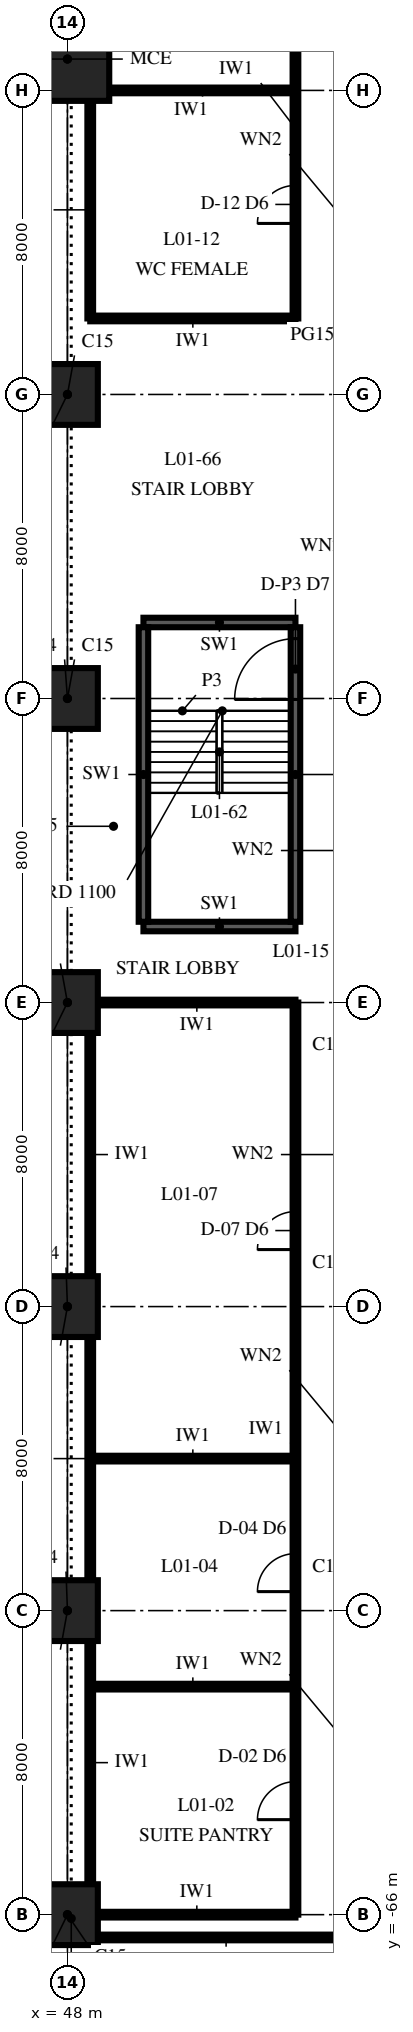
"""IFC4 building model, lengths in metres.
Left out: names, types, materials, properties, quantities, classifications, styles, units other than length and angle.
Written with IfcOpenShell. Run it as: python <this file> out.ifc"""

import sys

from ifc_helpers import new_model, si_unit, direction, frame, frame_2d, origin, origin_2d, place, context, subcontext, project, spatial, rectangle, extrude, element, fill, save


model = new_model("IFC4")
c1 = context("Model", 3, precision=1e-05, world=origin(), true_north=direction((0.0, 1.0)))
c2 = subcontext(c1, "Body", "Model", "MODEL_VIEW")
j1 = project(units=[si_unit("LENGTHUNIT", "METRE"), si_unit("PLANEANGLEUNIT", "RADIAN")], contexts=[c1])
p1 = place(None, origin())
s1 = spatial("IfcSite", under=j1, at=p1, CompositionType="ELEMENT")
p2 = place(p1, origin())
s2 = spatial("IfcBuilding", under=s1, at=p2, CompositionType="ELEMENT")
p3 = place(p2, frame((0.0, 0.0, 6.0)))
s3 = spatial("IfcBuildingStorey", under=s2, at=p3, CompositionType="ELEMENT", Elevation=6.0)
for number, where, z_axis, x_axis in (
    (1, (48.0, -66.0, 0.0), (0.0, 0.0, 1.0), (1.0, 0.0, 0.0)),
    (2, (48.0, -58.0, 0.0), (0.0, 0.0, 1.0), (1.0, 0.0, 0.0)),
    (3, (48.0, -50.0, 0.0), (0.0, 0.0, 1.0), (1.0, 0.0, 0.0)),
    (4, (48.0, -42.0, 0.0), (0.0, 0.0, 1.0), (1.0, 0.0, 0.0)),
    (5, (48.0, -34.0, 0.0), (0.0, 0.0, 1.0), (1.0, 0.0, 0.0)),
    (6, (48.0, -26.0, 0.0), (0.0, 0.0, 1.0), (1.0, 0.0, 0.0)),
):
    element("IfcColumn", number, at=place(p3, frame(where, z_axis=z_axis, x_axis=x_axis)), inside=s3, PredefinedType="COLUMN", context=c2, shape_type="SweptSolid", body=[
        extrude(rectangle(XDim=1.6, YDim=1.6, at=origin_2d()), origin(), (0.0, 0.0, 1.0), 6.0),
    ])
p4 = place(p3, frame((48.0, -17.175, 0.0), z_axis=(0.0, 0.0, 1.0), x_axis=(1.0, 0.0, 0.0)))
e7 = element("IfcColumn", 7, at=p4, inside=s3, PredefinedType="COLUMN", context=c2, shape_type="SweptSolid", body=[
    extrude(rectangle(XDim=2.2, YDim=2.2, at=origin_2d()), origin(), (0.0, 0.0, 1.0), 6.0),
])
for number, where, z_axis, x_axis in (
    (8, (50.0, -40.0, 0.0), (0.0, 0.0, 1.0), (1.0, 0.0, 0.0)),
    (9, (54.0, -32.0, 0.0), (0.0, 0.0, 1.0), (-1.0, 0.0, 0.0)),
):
    element("IfcWall", number, at=place(p3, frame(where, z_axis=z_axis, x_axis=x_axis)), inside=s3, PredefinedType="SOLIDWALL", context=c2, shape_type="SweptSolid", body=[
        extrude(rectangle(XDim=4.0, YDim=0.25, at=frame_2d((2.0, 0.0))), origin(), (0.0, 0.0, 1.0), 6.0),
    ])
p5 = place(p3, frame((54.0, -39.875, 0.0), z_axis=(0.0, 0.0, 1.0), x_axis=(0.0, 1.0, 0.0)))
e10 = element("IfcWall", 10, at=p5, inside=s3, PredefinedType="SOLIDWALL", context=c2, shape_type="SweptSolid", body=[
    extrude(rectangle(XDim=7.75, YDim=0.25, at=frame_2d((3.875, 0.0))), origin(), (0.0, 0.0, 1.0), 6.0),
])
p6 = place(p5, frame((5.85, 0.0, 0.0)))
e11 = element("IfcOpeningElement", 11, at=p6, cuts=e10, PredefinedType="OPENING", context=c2, shape_type="SweptSolid", body=[
    extrude(rectangle(XDim=1.6, YDim=2.1, at=frame_2d((0.8, 1.05))), frame((0.0, 0.14, 0.0), z_axis=(0.0, -1.0, 0.0), x_axis=(1.0, 0.0, 0.0)), (0.0, 0.0, 1.0), 0.28),
])
p7 = place(p3, frame((50.0, -32.125, 0.0), z_axis=(0.0, 0.0, 1.0), x_axis=(0.0, -1.0, 0.0)))
e12 = element("IfcWall", 12, at=p7, inside=s3, PredefinedType="SOLIDWALL", context=c2, shape_type="SweptSolid", body=[
    extrude(rectangle(XDim=7.75, YDim=0.25, at=frame_2d((3.875, 0.0))), origin(), (0.0, 0.0, 1.0), 6.0),
])
p8 = place(p3, frame((48.6, -65.19, 0.0), z_axis=(0.0, 0.0, 1.0), x_axis=(0.0, 1.0, 0.0)))
e13 = element("IfcWall", 13, at=p8, inside=s3, PredefinedType="PARTITIONING", context=c2, shape_type="SweptSolid", body=[
    extrude(rectangle(XDim=6.38, YDim=0.15, at=frame_2d((3.19, 0.0))), origin(), (0.0, 0.0, 1.0), 5.05),
])
for number, where, z_axis, x_axis in (
    (14, (48.6, -57.19, 0.0), (0.0, 0.0, 1.0), (0.0, 1.0, 0.0)),
    (15, (48.6, -49.19, 0.0), (0.0, 0.0, 1.0), (0.0, 1.0, 0.0)),
):
    element("IfcWall", number, at=place(p3, frame(where, z_axis=z_axis, x_axis=x_axis)), inside=s3, PredefinedType="PARTITIONING", context=c2, shape_type="SweptSolid", body=[
        extrude(rectangle(XDim=6.38, YDim=0.15, at=frame_2d((3.19, 0.0))), origin(), (0.0, 0.0, 1.0), 4.1),
    ])
p9 = place(p3, frame((48.6, -24.0, 0.0), z_axis=(0.0, 0.0, 1.0), x_axis=(0.0, 1.0, 0.0)))
e16 = element("IfcWall", 16, at=p9, inside=s3, PredefinedType="PARTITIONING", context=c2, shape_type="SweptSolid", body=[
    extrude(rectangle(XDim=5.715, YDim=0.15, at=frame_2d((2.857, 0.0))), origin(), (0.0, 0.0, 1.0), 5.7),
])
p10 = place(p3, frame((54.0, -66.0, 0.0), z_axis=(0.0, 0.0, 1.0), x_axis=(0.0, 1.0, 0.0)))
e17 = element("IfcWall", 17, at=p10, inside=s3, PredefinedType="PARTITIONING", context=c2, shape_type="SweptSolid", body=[
    extrude(rectangle(XDim=24.0, YDim=0.15, at=frame_2d((12.0, 0.0))), origin(), (0.0, 0.0, 1.0), 5.7),
])
p11 = place(p10, frame((2.5, 0.0, 0.0)))
e18 = element("IfcOpeningElement", 18, at=p11, cuts=e17, PredefinedType="OPENING", context=c2, shape_type="SweptSolid", body=[
    extrude(rectangle(XDim=1.0, YDim=2.1, at=frame_2d((0.5, 1.05))), frame((0.0, 0.09, 0.0), z_axis=(0.0, -1.0, 0.0), x_axis=(1.0, 0.0, 0.0)), (0.0, 0.0, 1.0), 0.18),
])
p12 = place(p10, frame((8.5, 0.0, 0.0)))
e19 = element("IfcOpeningElement", 19, at=p12, cuts=e17, PredefinedType="OPENING", context=c2, shape_type="SweptSolid", body=[
    extrude(rectangle(XDim=1.0, YDim=2.1, at=frame_2d((0.5, 1.05))), frame((0.0, 0.09, 0.0), z_axis=(0.0, -1.0, 0.0), x_axis=(1.0, 0.0, 0.0)), (0.0, 0.0, 1.0), 0.18),
])
p13 = place(p10, frame((17.5, 0.0, 0.0)))
e20 = element("IfcOpeningElement", 20, at=p13, cuts=e17, PredefinedType="OPENING", context=c2, shape_type="SweptSolid", body=[
    extrude(rectangle(XDim=1.0, YDim=2.1, at=frame_2d((0.5, 1.05))), frame((0.0, 0.09, 0.0), z_axis=(0.0, -1.0, 0.0), x_axis=(1.0, 0.0, 0.0)), (0.0, 0.0, 1.0), 0.18),
])
p14 = place(p3, frame((54.0, -24.0, 0.0), z_axis=(0.0, 0.0, 1.0), x_axis=(0.0, 1.0, 0.0)))
e21 = element("IfcWall", 21, at=p14, inside=s3, PredefinedType="PARTITIONING", context=c2, shape_type="SweptSolid", body=[
    extrude(rectangle(XDim=10.0, YDim=0.15, at=frame_2d((5.0, 0.0))), origin(), (0.0, 0.0, 1.0), 5.7),
])
p15 = place(p14, frame((2.5, 0.0, 0.0)))
e22 = element("IfcOpeningElement", 22, at=p15, cuts=e21, PredefinedType="OPENING", context=c2, shape_type="SweptSolid", body=[
    extrude(rectangle(XDim=1.0, YDim=2.1, at=frame_2d((0.5, 1.05))), frame((0.0, 0.09, 0.0), z_axis=(0.0, -1.0, 0.0), x_axis=(1.0, 0.0, 0.0)), (0.0, 0.0, 1.0), 0.18),
])
p16 = place(p14, frame((7.5, 0.0, 0.0)))
e23 = element("IfcOpeningElement", 23, at=p16, cuts=e21, PredefinedType="OPENING", context=c2, shape_type="SweptSolid", body=[
    extrude(rectangle(XDim=1.0, YDim=2.1, at=frame_2d((0.5, 1.05))), frame((0.0, 0.09, 0.0), z_axis=(0.0, -1.0, 0.0), x_axis=(1.0, 0.0, 0.0)), (0.0, 0.0, 1.0), 0.18),
])
p17 = place(p3, frame((48.81, -66.6, 0.0), z_axis=(0.0, 0.0, 1.0), x_axis=(1.0, 0.0, 0.0)))
e24 = element("IfcWall", 24, at=p17, inside=s3, PredefinedType="PARTITIONING", context=c2, shape_type="SweptSolid", body=[
    extrude(rectangle(XDim=6.73, YDim=0.15, at=frame_2d((3.365, 0.0))), origin(), (0.0, 0.0, 1.0), 5.05),
])
p18 = place(p3, frame((48.81, -66.0, 0.0), z_axis=(0.0, 0.0, 1.0), x_axis=(1.0, 0.0, 0.0)))
e25 = element("IfcWall", 25, at=p18, inside=s3, PredefinedType="PARTITIONING", context=c2, shape_type="SweptSolid", body=[
    extrude(rectangle(XDim=5.19, YDim=0.15, at=frame_2d((2.595, 0.0))), origin(), (0.0, 0.0, 1.0), 5.05),
])
for number, where, z_axis, x_axis in (
    (26, (48.6, -60.0, 0.0), (0.0, 0.0, 1.0), (1.0, 0.0, 0.0)),
    (27, (48.6, -54.0, 0.0), (0.0, 0.0, 1.0), (1.0, 0.0, 0.0)),
):
    element("IfcWall", number, at=place(p3, frame(where, z_axis=z_axis, x_axis=x_axis)), inside=s3, PredefinedType="PARTITIONING", context=c2, shape_type="SweptSolid", body=[
        extrude(rectangle(XDim=5.4, YDim=0.15, at=frame_2d((2.7, 0.0))), origin(), (0.0, 0.0, 1.0), 5.7),
    ])
p19 = place(p3, frame((48.81, -42.0, 0.0), z_axis=(0.0, 0.0, 1.0), x_axis=(1.0, 0.0, 0.0)))
e28 = element("IfcWall", 28, at=p19, inside=s3, PredefinedType="PARTITIONING", context=c2, shape_type="SweptSolid", body=[
    extrude(rectangle(XDim=5.19, YDim=0.15, at=frame_2d((2.595, 0.0))), origin(), (0.0, 0.0, 1.0), 4.1),
])
p20 = place(p3, frame((48.6, -24.0, 0.0), z_axis=(0.0, 0.0, 1.0), x_axis=(1.0, 0.0, 0.0)))
e29 = element("IfcWall", 29, at=p20, inside=s3, PredefinedType="PARTITIONING", context=c2, shape_type="SweptSolid", body=[
    extrude(rectangle(XDim=5.4, YDim=0.15, at=frame_2d((2.7, 0.0))), origin(), (0.0, 0.0, 1.0), 5.7),
])
p21 = place(p3, frame((49.11, -18.0, 0.0), z_axis=(0.0, 0.0, 1.0), x_axis=(1.0, 0.0, 0.0)))
e30 = element("IfcWall", 30, at=p21, inside=s3, PredefinedType="PARTITIONING", context=c2, shape_type="SweptSolid", body=[
    extrude(rectangle(XDim=4.89, YDim=0.15, at=frame_2d((2.445, 0.0))), origin(), (0.0, 0.0, 1.0), 5.7),
])
p22 = place(p6, origin())
e31 = element("IfcDoor", 31, at=p22, inside=s3, OperationType="DOUBLE_DOOR_SINGLE_SWING", PredefinedType="DOOR", context=c2, shape_type="SweptSolid", body=[
    extrude(rectangle(XDim=1.6, YDim=2.1, at=frame_2d((0.8, 1.05))), frame((0.0, 0.125, 0.0), z_axis=(0.0, -1.0, 0.0), x_axis=(1.0, 0.0, 0.0)), (0.0, 0.0, 1.0), 0.25),
])
fill(e11, e31)
p23 = place(p11, origin())
e32 = element("IfcDoor", 32, at=p23, inside=s3, OperationType="SINGLE_SWING_LEFT", PredefinedType="DOOR", context=c2, shape_type="SweptSolid", body=[
    extrude(rectangle(XDim=1.0, YDim=2.1, at=frame_2d((0.5, 1.05))), frame((0.0, 0.075, 0.0), z_axis=(0.0, -1.0, 0.0), x_axis=(1.0, 0.0, 0.0)), (0.0, 0.0, 1.0), 0.149),
])
fill(e18, e32)
p24 = place(p12, origin())
e33 = element("IfcDoor", 33, at=p24, inside=s3, OperationType="SINGLE_SWING_LEFT", PredefinedType="DOOR", context=c2, shape_type="SweptSolid", body=[
    extrude(rectangle(XDim=1.0, YDim=2.1, at=frame_2d((0.5, 1.05))), frame((0.0, 0.075, 0.0), z_axis=(0.0, -1.0, 0.0), x_axis=(1.0, 0.0, 0.0)), (0.0, 0.0, 1.0), 0.149),
])
fill(e19, e33)
p25 = place(p13, origin())
e34 = element("IfcDoor", 34, at=p25, inside=s3, OperationType="SINGLE_SWING_LEFT", PredefinedType="DOOR", context=c2, shape_type="SweptSolid", body=[
    extrude(rectangle(XDim=1.0, YDim=2.1, at=frame_2d((0.5, 1.05))), frame((0.0, 0.075, 0.0), z_axis=(0.0, -1.0, 0.0), x_axis=(1.0, 0.0, 0.0)), (0.0, 0.0, 1.0), 0.149),
])
fill(e20, e34)
p26 = place(p15, origin())
e35 = element("IfcDoor", 35, at=p26, inside=s3, OperationType="SINGLE_SWING_LEFT", PredefinedType="DOOR", context=c2, shape_type="SweptSolid", body=[
    extrude(rectangle(XDim=1.0, YDim=2.1, at=frame_2d((0.5, 1.05))), frame((0.0, 0.075, 0.0), z_axis=(0.0, -1.0, 0.0), x_axis=(1.0, 0.0, 0.0)), (0.0, 0.0, 1.0), 0.149),
])
fill(e22, e35)
save(model, sys.argv[1])
